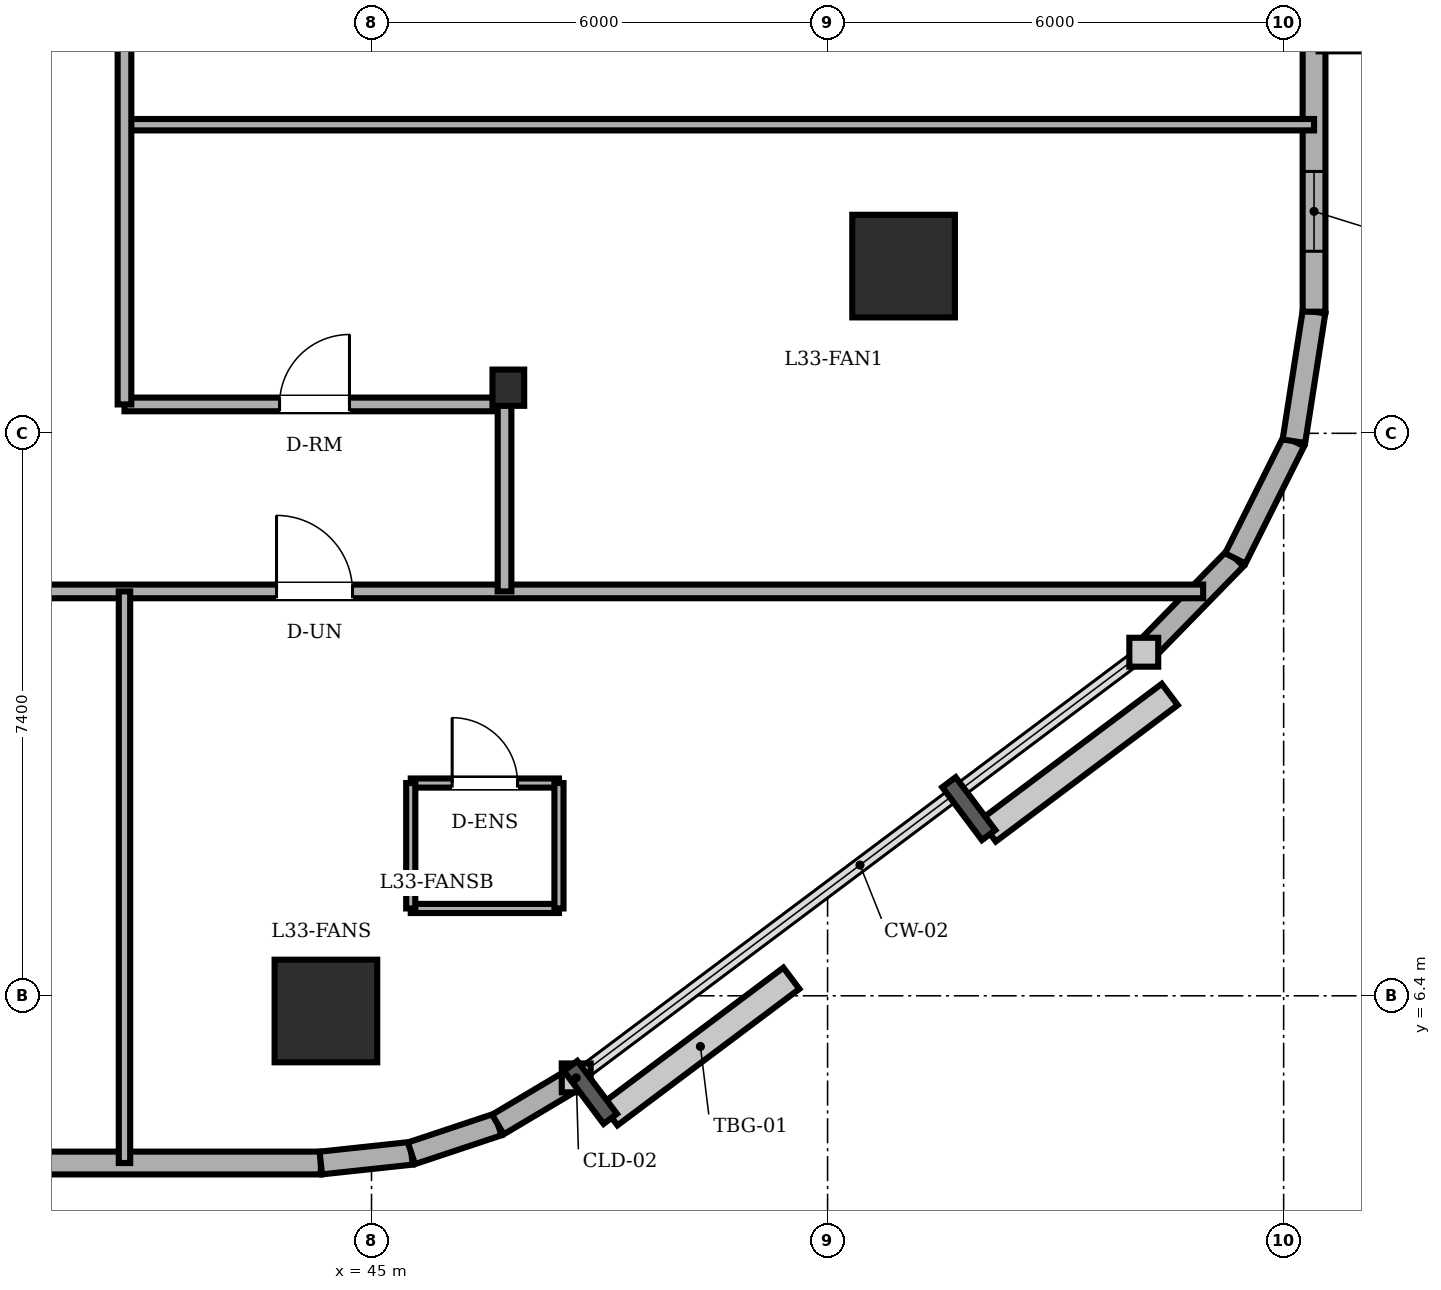
"""IFC4 building model, lengths in metres.
Left out: names, types, materials, properties, quantities, classifications, styles, units other than length and angle.
Written with IfcOpenShell. Run it as: python <this file> out.ifc"""

import sys

from ifc_helpers import new_model, si_unit, direction, frame, frame_2d, origin, origin_2d, place, context, subcontext, project, spatial, rectangle, circle, i_section, extrude, element, fill, save


model = new_model("IFC4")
c1 = context("Model", 3, precision=1e-05, world=origin(), true_north=direction((0.0, 1.0)))
c2 = subcontext(c1, "Body", "Model", "MODEL_VIEW")
j1 = project(units=[si_unit("LENGTHUNIT", "METRE"), si_unit("PLANEANGLEUNIT", "RADIAN")], contexts=[c1])
p1 = place(None, origin())
s1 = spatial("IfcSite", under=j1, at=p1, CompositionType="ELEMENT")
p2 = place(p1, origin())
s2 = spatial("IfcBuilding", under=s1, at=p2, CompositionType="ELEMENT")
p3 = place(p2, frame((0.0, 0.0, 125.9)))
s3 = spatial("IfcBuildingStorey", under=s2, at=p3, CompositionType="ELEMENT", Elevation=125.9)
for number, where, z_axis, x_axis in (
    (1, (44.4, 6.2, 0.0), (0.0, 0.0, 1.0), (1.0, 0.0, 0.0)),
    (2, (52.0, 16.0, 0.0), (0.0, 0.0, 1.0), (1.0, 0.0, 0.0)),
):
    element("IfcColumn", number, at=place(p3, frame(where, z_axis=z_axis, x_axis=x_axis)), inside=s3, PredefinedType="COLUMN", context=c2, shape_type="SweptSolid", body=[
        extrude(circle(Radius=0.675, at=origin_2d()), origin(), (0.0, 0.0, 1.0), 3.6),
    ])
p4 = place(p3, frame((46.8, 14.4, 0.0), z_axis=(0.0, 0.0, 1.0), x_axis=(1.0, 0.0, 0.0)))
e3 = element("IfcColumn", 3, at=p4, inside=s3, PredefinedType="COLUMN", context=c2, shape_type="SweptSolid", body=[
    extrude(i_section(OverallWidth=0.417, OverallDepth=0.477, WebThickness=0.036, FlangeThickness=0.057, FilletRadius=0.015, at=origin_2d()), origin(), (0.0, 0.0, 1.0), 3.6),
])
p5 = place(p3, frame((14.4, 4.2, 0.0), z_axis=(0.0, 0.0, 1.0), x_axis=(1.0, 0.0, 0.0)))
e4 = element("IfcWall", 4, at=p5, inside=s3, PredefinedType="SOLIDWALL", context=c2, shape_type="SweptSolid", body=[
    extrude(rectangle(XDim=29.933, YDim=0.3, at=frame_2d((14.967, 0.0))), origin(), (0.0, 0.0, 1.0), 3.4),
])
p6 = place(p5, frame((5.05, 0.0, 0.0)))
e5 = element("IfcOpeningElement", 5, at=p6, cuts=e4, PredefinedType="OPENING", context=c2, shape_type="SweptSolid", body=[
    extrude(rectangle(XDim=0.95, YDim=2.2, at=frame_2d((0.475, 1.1))), frame((0.0, 0.16, 0.0), z_axis=(0.0, -1.0, 0.0), x_axis=(1.0, 0.0, 0.0)), (0.0, 0.0, 1.0), 0.32),
])
p7 = place(p5, frame((2.808, 0.0, 0.85)))
e6 = element("IfcOpeningElement", 6, at=p7, cuts=e4, PredefinedType="OPENING", context=c2, shape_type="SweptSolid", body=[
    extrude(rectangle(XDim=1.65, YDim=1.55, at=frame_2d((0.825, 0.775))), frame((0.0, 0.16, 0.0), z_axis=(0.0, -1.0, 0.0), x_axis=(1.0, 0.0, 0.0)), (0.0, 0.0, 1.0), 0.32),
])
p8 = place(p5, frame((11.275, 0.0, 0.85)))
e7 = element("IfcOpeningElement", 7, at=p8, cuts=e4, PredefinedType="OPENING", context=c2, shape_type="SweptSolid", body=[
    extrude(rectangle(XDim=1.65, YDim=1.55, at=frame_2d((0.825, 0.775))), frame((0.0, 0.16, 0.0), z_axis=(0.0, -1.0, 0.0), x_axis=(1.0, 0.0, 0.0)), (0.0, 0.0, 1.0), 0.32),
])
p9 = place(p5, frame((17.625, 0.0, 0.85)))
e8 = element("IfcOpeningElement", 8, at=p9, cuts=e4, PredefinedType="OPENING", context=c2, shape_type="SweptSolid", body=[
    extrude(rectangle(XDim=1.65, YDim=1.55, at=frame_2d((0.825, 0.775))), frame((0.0, 0.16, 0.0), z_axis=(0.0, -1.0, 0.0), x_axis=(1.0, 0.0, 0.0)), (0.0, 0.0, 1.0), 0.32),
])
p10 = place(p5, frame((22.075, 0.0, 0.85)))
e9 = element("IfcOpeningElement", 9, at=p10, cuts=e4, PredefinedType="OPENING", context=c2, shape_type="SweptSolid", body=[
    extrude(rectangle(XDim=1.65, YDim=1.55, at=frame_2d((0.825, 0.775))), frame((0.0, 0.16, 0.0), z_axis=(0.0, -1.0, 0.0), x_axis=(1.0, 0.0, 0.0)), (0.0, 0.0, 1.0), 0.32),
])
p11 = place(p3, frame((44.333, 4.2, 0.0), z_axis=(0.0, 0.0, 1.0), x_axis=(0.994289103787, 0.106720092254, 0.0)))
e10 = element("IfcWall", 10, at=p11, inside=s3, PredefinedType="SOLIDWALL", context=c2, shape_type="SweptSolid", body=[
    extrude(rectangle(XDim=1.199, YDim=0.3, at=frame_2d((0.599, 0.0))), origin(), (0.0, 0.0, 1.0), 3.4),
])
p12 = place(p3, frame((45.525, 4.328, 0.0), z_axis=(0.0, 0.0, 1.0), x_axis=(0.948744332129, 0.316044604847, 0.0)))
e11 = element("IfcWall", 11, at=p12, inside=s3, PredefinedType="SOLIDWALL", context=c2, shape_type="SweptSolid", body=[
    extrude(rectangle(XDim=1.2, YDim=0.3, at=frame_2d((0.6, 0.0))), origin(), (0.0, 0.0, 1.0), 3.4),
])
p13 = place(p3, frame((46.663, 4.707, 0.0), z_axis=(0.0, 0.0, 1.0), x_axis=(0.859320591642, 0.511437308749, 0.0)))
e12 = element("IfcWall", 12, at=p13, inside=s3, PredefinedType="SOLIDWALL", context=c2, shape_type="SweptSolid", body=[
    extrude(rectangle(XDim=1.199, YDim=0.3, at=frame_2d((0.599, 0.0))), origin(), (0.0, 0.0, 1.0), 3.4),
])
for number, where, z_axis, x_axis in (
    (13, (55.16, 10.92, 0.0), (0.0, 0.0, 1.0), (0.698, 0.716, 0.0)),
    (14, (56.364, 12.154, 0.0), (0.0, 0.0, 1.0), (0.447, 0.894, 0.0)),
):
    element("IfcWall", number, at=place(p3, frame(where, z_axis=z_axis, x_axis=x_axis)), inside=s3, PredefinedType="SOLIDWALL", context=c2, shape_type="SweptSolid", body=[
        extrude(rectangle(XDim=1.724, YDim=0.3, at=frame_2d((0.862, 0.0))), origin(), (0.0, 0.0, 1.0), 3.4),
    ])
p14 = place(p3, frame((57.135, 13.696, 0.0), z_axis=(0.0, 0.0, 1.0), x_axis=(0.153620989032, 0.988129845581, 0.0)))
e15 = element("IfcWall", 15, at=p14, inside=s3, PredefinedType="SOLIDWALL", context=c2, shape_type="SweptSolid", body=[
    extrude(rectangle(XDim=1.724, YDim=0.3, at=frame_2d((0.862, 0.0))), origin(), (0.0, 0.0, 1.0), 3.4),
])
p15 = place(p3, frame((57.4, 15.4, 0.0), z_axis=(0.0, 0.0, 1.0), x_axis=(0.0, 1.0, 0.0)))
e16 = element("IfcWall", 16, at=p15, inside=s3, PredefinedType="SOLIDWALL", context=c2, shape_type="SweptSolid", body=[
    extrude(rectangle(XDim=4.0, YDim=0.3, at=frame_2d((2.0, 0.0))), origin(), (0.0, 0.0, 1.0), 3.4),
])
p16 = place(p15, frame((0.795, 0.0, 0.85)))
e17 = element("IfcOpeningElement", 17, at=p16, cuts=e16, PredefinedType="OPENING", context=c2, shape_type="SweptSolid", body=[
    extrude(rectangle(XDim=1.05, YDim=1.55, at=frame_2d((0.525, 0.775))), frame((0.0, 0.16, 0.0), z_axis=(0.0, -1.0, 0.0), x_axis=(1.0, 0.0, 0.0)), (0.0, 0.0, 1.0), 0.32),
])
p17 = place(p3, frame((45.516, 9.199, 0.0), z_axis=(0.0, 0.0, 1.0), x_axis=(1.0, 0.0, 0.0)))
e18 = element("IfcWall", 18, at=p17, inside=s3, PredefinedType="PARTITIONING", context=c2, shape_type="SweptSolid", body=[
    extrude(rectangle(XDim=1.95, YDim=0.12, at=frame_2d((0.975, 0.0))), origin(), (0.0, 0.0, 1.0), 3.4),
])
p18 = place(p17, frame((0.545, 0.0, 0.0)))
e19 = element("IfcOpeningElement", 19, at=p18, cuts=e18, PredefinedType="OPENING", context=c2, shape_type="SweptSolid", body=[
    extrude(rectangle(XDim=0.86, YDim=2.1, at=frame_2d((0.43, 1.05))), frame((0.0, 0.07, 0.0), z_axis=(0.0, -1.0, 0.0), x_axis=(1.0, 0.0, 0.0)), (0.0, 0.0, 1.0), 0.14),
])
p19 = place(p3, frame((47.466, 7.549, 0.0), z_axis=(0.0, 0.0, 1.0), x_axis=(-1.0, 0.0, 0.0)))
e20 = element("IfcWall", 20, at=p19, inside=s3, PredefinedType="PARTITIONING", context=c2, shape_type="SweptSolid", body=[
    extrude(rectangle(XDim=1.95, YDim=0.12, at=frame_2d((0.975, 0.0))), origin(), (0.0, 0.0, 1.0), 3.4),
])
for number, where, z_axis, x_axis in (
    (21, (45.516, 9.199, 0.0), (0.0, 0.0, 1.0), (0.0, -1.0, 0.0)),
    (22, (47.466, 7.549, 0.0), (0.0, 0.0, 1.0), (0.0, 1.0, 0.0)),
):
    element("IfcWall", number, at=place(p3, frame(where, z_axis=z_axis, x_axis=x_axis)), inside=s3, PredefinedType="PARTITIONING", context=c2, shape_type="SweptSolid", body=[
        extrude(rectangle(XDim=1.65, YDim=0.12, at=frame_2d((0.825, 0.0))), origin(), (0.0, 0.0, 1.0), 3.4),
    ])
p20 = place(p3, frame((8.8, 11.72, 0.0), z_axis=(0.0, 0.0, 1.0), x_axis=(1.0, 0.0, 0.0)))
e23 = element("IfcWall", 23, at=p20, inside=s3, PredefinedType="PARTITIONING", context=c2, shape_type="SweptSolid", body=[
    extrude(rectangle(XDim=47.141, YDim=0.18, at=frame_2d((23.57, 0.0))), origin(), (0.0, 0.0, 1.0), 3.4),
])
p21 = place(p20, frame((17.24, 0.0, 0.0)))
e24 = element("IfcOpeningElement", 24, at=p21, cuts=e23, PredefinedType="OPENING", context=c2, shape_type="SweptSolid", body=[
    extrude(rectangle(XDim=0.92, YDim=2.1, at=frame_2d((0.46, 1.05))), frame((0.0, 0.1, 0.0), z_axis=(0.0, -1.0, 0.0), x_axis=(1.0, 0.0, 0.0)), (0.0, 0.0, 1.0), 0.2),
])
p22 = place(p20, frame((34.95, 0.0, 0.0)))
e25 = element("IfcOpeningElement", 25, at=p22, cuts=e23, PredefinedType="OPENING", context=c2, shape_type="SweptSolid", body=[
    extrude(rectangle(XDim=1.0, YDim=2.15, at=frame_2d((0.5, 1.075))), frame((0.0, 0.1, 0.0), z_axis=(0.0, -1.0, 0.0), x_axis=(1.0, 0.0, 0.0)), (0.0, 0.0, 1.0), 0.2),
])
p23 = place(p20, frame((8.04, 0.0, 0.0)))
e26 = element("IfcOpeningElement", 26, at=p23, cuts=e23, PredefinedType="OPENING", context=c2, shape_type="SweptSolid", body=[
    extrude(rectangle(XDim=0.92, YDim=2.1, at=frame_2d((0.46, 1.05))), frame((0.0, 0.1, 0.0), z_axis=(0.0, -1.0, 0.0), x_axis=(1.0, 0.0, 0.0)), (0.0, 0.0, 1.0), 0.2),
])
p24 = place(p20, frame((25.775, 0.0, 0.0)))
e27 = element("IfcOpeningElement", 27, at=p24, cuts=e23, PredefinedType="OPENING", context=c2, shape_type="SweptSolid", body=[
    extrude(rectangle(XDim=1.0, YDim=2.15, at=frame_2d((0.5, 1.075))), frame((0.0, 0.1, 0.0), z_axis=(0.0, -1.0, 0.0), x_axis=(1.0, 0.0, 0.0)), (0.0, 0.0, 1.0), 0.2),
])
p25 = place(p3, frame((41.75, 14.18, 0.0), z_axis=(0.0, 0.0, 1.0), x_axis=(1.0, 0.0, 0.0)))
e28 = element("IfcWall", 28, at=p25, inside=s3, PredefinedType="PARTITIONING", context=c2, shape_type="SweptSolid", body=[
    extrude(rectangle(XDim=5.0, YDim=0.18, at=frame_2d((2.5, 0.0))), origin(), (0.0, 0.0, 1.0), 2.882),
])
p26 = place(p25, frame((2.04, 0.0, 0.0)))
e29 = element("IfcOpeningElement", 29, at=p26, cuts=e28, PredefinedType="OPENING", context=c2, shape_type="SweptSolid", body=[
    extrude(rectangle(XDim=0.92, YDim=2.1, at=frame_2d((0.46, 1.05))), frame((0.0, 0.1, 0.0), z_axis=(0.0, -1.0, 0.0), x_axis=(1.0, 0.0, 0.0)), (0.0, 0.0, 1.0), 0.2),
])
p27 = place(p3, frame((41.75, 17.86, 0.0), z_axis=(0.0, 0.0, 1.0), x_axis=(1.0, 0.0, 0.0)))
e30 = element("IfcWall", 30, at=p27, inside=s3, PredefinedType="PARTITIONING", context=c2, shape_type="SweptSolid", body=[
    extrude(rectangle(XDim=15.65, YDim=0.15, at=frame_2d((7.825, 0.0))), origin(), (0.0, 0.0, 1.0), 3.4),
])
p28 = place(p3, frame((41.75, 4.2, 0.0), z_axis=(0.0, 0.0, 1.0), x_axis=(0.0, 1.0, 0.0)))
e31 = element("IfcWall", 31, at=p28, inside=s3, PredefinedType="PARTITIONING", context=c2, shape_type="SweptSolid", body=[
    extrude(rectangle(XDim=7.52, YDim=0.15, at=frame_2d((3.76, 0.0))), origin(), (0.0, 0.0, 1.0), 3.4),
])
p29 = place(p3, frame((41.75, 14.18, 0.0), z_axis=(0.0, 0.0, 1.0), x_axis=(0.0, 1.0, 0.0)))
e32 = element("IfcWall", 32, at=p29, inside=s3, PredefinedType="PARTITIONING", context=c2, shape_type="SweptSolid", body=[
    extrude(rectangle(XDim=19.64, YDim=0.18, at=frame_2d((9.82, 0.0))), origin(), (0.0, 0.0, 1.0), 3.4),
])
p30 = place(p29, frame((7.273, 0.0, 0.0)))
e33 = element("IfcOpeningElement", 33, at=p30, cuts=e32, PredefinedType="OPENING", context=c2, shape_type="SweptSolid", body=[
    extrude(rectangle(XDim=0.92, YDim=2.1, at=frame_2d((0.46, 1.05))), frame((0.0, 0.1, 0.0), z_axis=(0.0, -1.0, 0.0), x_axis=(1.0, 0.0, 0.0)), (0.0, 0.0, 1.0), 0.2),
])
p31 = place(p29, frame((13.412, 0.0, 0.0)))
e34 = element("IfcOpeningElement", 34, at=p31, cuts=e32, PredefinedType="OPENING", context=c2, shape_type="SweptSolid", body=[
    extrude(rectangle(XDim=0.92, YDim=2.1, at=frame_2d((0.46, 1.05))), frame((0.0, 0.1, 0.0), z_axis=(0.0, -1.0, 0.0), x_axis=(1.0, 0.0, 0.0)), (0.0, 0.0, 1.0), 0.2),
])
p32 = place(p3, frame((46.75, 11.72, 0.0), z_axis=(0.0, 0.0, 1.0), x_axis=(0.0, 1.0, 0.0)))
e35 = element("IfcWall", 35, at=p32, inside=s3, PredefinedType="PARTITIONING", context=c2, shape_type="SweptSolid", body=[
    extrude(rectangle(XDim=2.46, YDim=0.18, at=frame_2d((1.23, 0.0))), origin(), (0.0, 0.0, 1.0), 2.882),
])
p33 = place(p16, origin())
e36 = element("IfcWindow", 36, at=p33, inside=s3, PartitioningType="SINGLE_PANEL", PredefinedType="WINDOW", context=c2, shape_type="SweptSolid", body=[
    extrude(rectangle(XDim=1.05, YDim=1.55, at=frame_2d((0.525, 0.775))), frame((0.0, 0.03, 0.0), z_axis=(0.0, -1.0, 0.0), x_axis=(1.0, 0.0, 0.0)), (0.0, 0.0, 1.0), 0.06),
])
fill(e17, e36)
p34 = place(p18, origin())
e37 = element("IfcDoor", 37, at=p34, inside=s3, OperationType="SINGLE_SWING_LEFT", PredefinedType="DOOR", context=c2, shape_type="SweptSolid", body=[
    extrude(rectangle(XDim=0.86, YDim=2.1, at=frame_2d((0.43, 1.05))), frame((0.0, 0.025, 0.0), z_axis=(0.0, -1.0, 0.0), x_axis=(1.0, 0.0, 0.0)), (0.0, 0.0, 1.0), 0.05),
])
fill(e19, e37)
p35 = place(p26, origin())
e38 = element("IfcDoor", 38, at=p35, inside=s3, OperationType="SINGLE_SWING_RIGHT", PredefinedType="DOOR", context=c2, shape_type="SweptSolid", body=[
    extrude(rectangle(XDim=0.92, YDim=2.1, at=frame_2d((0.46, 1.05))), frame((0.0, 0.025, 0.0), z_axis=(0.0, -1.0, 0.0), x_axis=(1.0, 0.0, 0.0)), (0.0, 0.0, 1.0), 0.05),
])
fill(e29, e38)
p36 = place(p22, origin())
e39 = element("IfcDoor", 39, at=p36, inside=s3, OperationType="SINGLE_SWING_LEFT", PredefinedType="DOOR", context=c2, shape_type="SweptSolid", body=[
    extrude(rectangle(XDim=1.0, YDim=2.15, at=frame_2d((0.5, 1.075))), frame((0.0, 0.025, 0.0), z_axis=(0.0, -1.0, 0.0), x_axis=(1.0, 0.0, 0.0)), (0.0, 0.0, 1.0), 0.05),
])
fill(e25, e39)
save(model, sys.argv[1])
